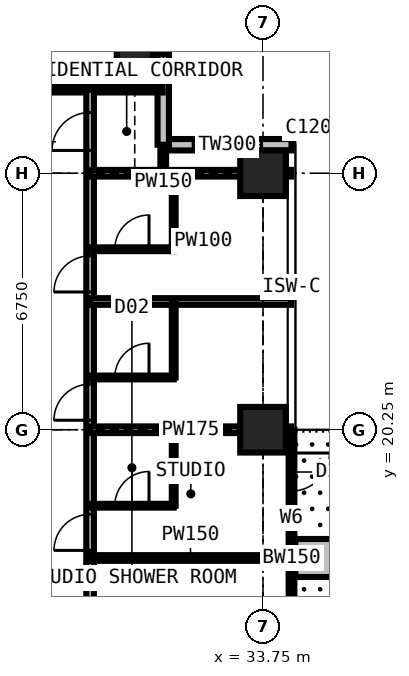
"""IFC4 building model, lengths in metres.
Left out: names, types, materials, properties, quantities, classifications, styles, units other than length and angle.
Written with IfcOpenShell. Run it as: python <this file> out.ifc"""

import sys

from ifc_helpers import new_model, si_unit, direction, frame, frame_2d, origin, origin_2d, place, context, subcontext, project, spatial, rectangle, extrude, element, fill, save


model = new_model("IFC4")
c1 = context("Model", 3, precision=1e-05, world=origin(), true_north=direction((0.0, 1.0)))
c2 = subcontext(c1, "Body", "Model", "MODEL_VIEW")
j1 = project(units=[si_unit("LENGTHUNIT", "METRE"), si_unit("PLANEANGLEUNIT", "RADIAN")], contexts=[c1])
p1 = place(None, origin())
s1 = spatial("IfcSite", under=j1, at=p1, CompositionType="ELEMENT")
p2 = place(p1, origin())
s2 = spatial("IfcBuilding", under=s1, at=p2, CompositionType="ELEMENT")
p3 = place(p2, frame((0.0, 0.0, 192.6)))
s3 = spatial("IfcBuildingStorey", under=s2, at=p3, CompositionType="ELEMENT", Elevation=192.6)
p4 = place(p3, frame((30.375, 30.375, 0.0), z_axis=(0.0, 0.0, 1.0), x_axis=(1.0, 0.0, 0.0)))
e1 = element("IfcColumn", 1, at=p4, inside=s3, PredefinedType="COLUMN", context=c2, shape_type="SweptSolid", body=[
    extrude(rectangle(XDim=0.95, YDim=0.95, at=origin_2d()), origin(), (0.0, 0.0, 1.0), 3.6),
])
for number, where, z_axis, x_axis in (
    (2, (33.75, 20.25, 0.0), (0.0, 0.0, 1.0), (1.0, 0.0, 0.0)),
    (3, (33.75, 27.0, 0.0), (0.0, 0.0, 1.0), (1.0, 0.0, 0.0)),
):
    element("IfcColumn", number, at=place(p3, frame(where, z_axis=z_axis, x_axis=x_axis)), inside=s3, PredefinedType="COLUMN", context=c2, shape_type="SweptSolid", body=[
        extrude(rectangle(XDim=1.2, YDim=1.2, at=origin_2d()), origin(), (0.0, 0.0, 1.0), 3.6),
    ])
p5 = place(p3, frame((34.5, 20.25, 0.0), z_axis=(0.0, 0.0, 1.0), x_axis=(0.0, -1.0, 0.0)))
e4 = element("IfcWall", 4, at=p5, inside=s3, PredefinedType="SOLIDWALL", context=c2, shape_type="SweptSolid", body=[
    extrude(rectangle(XDim=6.75, YDim=0.15, at=frame_2d((3.375, 0.0))), origin(), (0.0, 0.0, 1.0), 3.375),
])
p6 = place(p5, frame((0.613, 0.0, 0.0)))
e5 = element("IfcOpeningElement", 5, at=p6, cuts=e4, PredefinedType="OPENING", context=c2, shape_type="SweptSolid", body=[
    extrude(rectangle(XDim=1.0, YDim=2.2, at=frame_2d((0.5, 1.1))), frame((0.0, 0.085, 0.0), z_axis=(0.0, -1.0, 0.0), x_axis=(1.0, 0.0, 0.0)), (0.0, 0.0, 1.0), 0.17),
])
p7 = place(p5, frame((1.725, 0.0, 0.9)))
e6 = element("IfcOpeningElement", 6, at=p7, cuts=e4, PredefinedType="OPENING", context=c2, shape_type="SweptSolid", body=[
    extrude(rectangle(XDim=1.2, YDim=1.8, at=frame_2d((0.6, 0.9))), frame((0.0, 0.085, 0.0), z_axis=(0.0, -1.0, 0.0), x_axis=(1.0, 0.0, 0.0)), (0.0, 0.0, 1.0), 0.17),
])
p8 = place(p5, frame((5.137, 0.0, 0.0)))
e7 = element("IfcOpeningElement", 7, at=p8, cuts=e4, PredefinedType="OPENING", context=c2, shape_type="SweptSolid", body=[
    extrude(rectangle(XDim=1.0, YDim=2.2, at=frame_2d((0.5, 1.1))), frame((0.0, 0.085, 0.0), z_axis=(0.0, -1.0, 0.0), x_axis=(1.0, 0.0, 0.0)), (0.0, 0.0, 1.0), 0.17),
])
p9 = place(p5, frame((3.825, 0.0, 0.9)))
e8 = element("IfcOpeningElement", 8, at=p9, cuts=e4, PredefinedType="OPENING", context=c2, shape_type="SweptSolid", body=[
    extrude(rectangle(XDim=1.2, YDim=1.8, at=frame_2d((0.6, 0.9))), frame((0.0, 0.085, 0.0), z_axis=(0.0, -1.0, 0.0), x_axis=(1.0, 0.0, 0.0)), (0.0, 0.0, 1.0), 0.17),
])
p10 = place(p3, frame((34.5, 27.75, 0.0), z_axis=(0.0, 0.0, 1.0), x_axis=(-1.0, 0.0, 0.0)))
e9 = element("IfcWall", 9, at=p10, inside=s3, PredefinedType="SOLIDWALL", context=c2, shape_type="SweptSolid", body=[
    extrude(rectangle(XDim=3.375, YDim=0.3, at=frame_2d((1.688, 0.0))), origin(), (0.0, 0.0, 1.0), 3.375),
])
p11 = place(p10, frame((0.788, 0.0, 0.6)))
e10 = element("IfcOpeningElement", 10, at=p11, cuts=e9, PredefinedType="OPENING", context=c2, shape_type="SweptSolid", body=[
    extrude(rectangle(XDim=1.8, YDim=2.1, at=frame_2d((0.9, 1.05))), frame((0.0, 0.16, 0.0), z_axis=(0.0, -1.0, 0.0), x_axis=(1.0, 0.0, 0.0)), (0.0, 0.0, 1.0), 0.32),
])
p12 = place(p3, frame((31.125, 27.75, 0.0), z_axis=(0.0, 0.0, 1.0), x_axis=(0.0, 1.0, 0.0)))
e11 = element("IfcWall", 11, at=p12, inside=s3, PredefinedType="SOLIDWALL", context=c2, shape_type="SweptSolid", body=[
    extrude(rectangle(XDim=3.375, YDim=0.3, at=frame_2d((1.688, 0.0))), origin(), (0.0, 0.0, 1.0), 3.375),
])
p13 = place(p12, frame((1.663, 0.0, 0.9)))
e12 = element("IfcOpeningElement", 12, at=p13, cuts=e11, PredefinedType="OPENING", context=c2, shape_type="SweptSolid", body=[
    extrude(rectangle(XDim=1.5, YDim=1.8, at=frame_2d((0.75, 0.9))), frame((0.0, 0.16, 0.0), z_axis=(0.0, -1.0, 0.0), x_axis=(1.0, 0.0, 0.0)), (0.0, 0.0, 1.0), 0.32),
])
p14 = place(p3, frame((34.6, 16.875, 0.0), z_axis=(0.0, 0.0, 1.0), x_axis=(1.0, 0.0, 0.0)))
e13 = element("IfcWall", 13, at=p14, inside=s3, PredefinedType="USERDEFINED", context=c2, shape_type="SweptSolid", body=[
    extrude(rectangle(XDim=2.2, YDim=1.0, at=frame_2d((1.1, 0.0))), origin(), (0.0, 0.0, 1.0), 0.9),
])
p15 = place(p3, frame((11.3, 29.2, 0.0), z_axis=(0.0, 0.0, 1.0), x_axis=(1.0, 0.0, 0.0)))
e14 = element("IfcWall", 14, at=p15, inside=s3, PredefinedType="PARTITIONING", context=c2, shape_type="SweptSolid", body=[
    extrude(rectangle(XDim=19.809, YDim=0.15, at=frame_2d((9.904, 0.0))), origin(), (0.0, 0.0, 1.0), 3.375),
])
p16 = place(p15, frame((12.9, 0.0, 0.0)))
e15 = element("IfcOpeningElement", 15, at=p16, cuts=e14, PredefinedType="OPENING", context=c2, shape_type="SweptSolid", body=[
    extrude(rectangle(XDim=1.0, YDim=2.2, at=frame_2d((0.5, 1.1))), frame((0.0, 0.085, 0.0), z_axis=(0.0, -1.0, 0.0), x_axis=(1.0, 0.0, 0.0)), (0.0, 0.0, 1.0), 0.17),
])
p17 = place(p15, frame((5.825, 0.0, 0.0)))
e16 = element("IfcOpeningElement", 16, at=p17, cuts=e14, PredefinedType="OPENING", context=c2, shape_type="SweptSolid", body=[
    extrude(rectangle(XDim=0.95, YDim=2.2, at=frame_2d((0.475, 1.1))), frame((0.0, 0.085, 0.0), z_axis=(0.0, -1.0, 0.0), x_axis=(1.0, 0.0, 0.0)), (0.0, 0.0, 1.0), 0.17),
])
p18 = place(p15, frame((0.6, 0.0, 0.0)))
e17 = element("IfcOpeningElement", 17, at=p18, cuts=e14, PredefinedType="OPENING", context=c2, shape_type="SweptSolid", body=[
    extrude(rectangle(XDim=1.0, YDim=2.2, at=frame_2d((0.5, 1.1))), frame((0.0, 0.085, 0.0), z_axis=(0.0, -1.0, 0.0), x_axis=(1.0, 0.0, 0.0)), (0.0, 0.0, 1.0), 0.17),
])
p19 = place(p3, frame((29.2, 11.3, 0.0), z_axis=(0.0, 0.0, 1.0), x_axis=(0.0, 1.0, 0.0)))
e18 = element("IfcWall", 18, at=p19, inside=s3, PredefinedType="PARTITIONING", context=c2, shape_type="SweptSolid", body=[
    extrude(rectangle(XDim=17.9, YDim=0.2, at=frame_2d((8.95, 0.0))), origin(), (0.0, 0.0, 1.0), 3.375),
])
p20 = place(p19, frame((5.775, 0.0, 0.0)))
e19 = element("IfcOpeningElement", 19, at=p20, cuts=e18, PredefinedType="OPENING", context=c2, shape_type="SweptSolid", body=[
    extrude(rectangle(XDim=0.95, YDim=2.2, at=frame_2d((0.475, 1.1))), frame((0.0, 0.11, 0.0), z_axis=(0.0, -1.0, 0.0), x_axis=(1.0, 0.0, 0.0)), (0.0, 0.0, 1.0), 0.22),
])
p21 = place(p19, frame((9.2, 0.0, 0.0)))
e20 = element("IfcOpeningElement", 20, at=p21, cuts=e18, PredefinedType="OPENING", context=c2, shape_type="SweptSolid", body=[
    extrude(rectangle(XDim=0.95, YDim=2.2, at=frame_2d((0.475, 1.1))), frame((0.0, 0.11, 0.0), z_axis=(0.0, -1.0, 0.0), x_axis=(1.0, 0.0, 0.0)), (0.0, 0.0, 1.0), 0.22),
])
p22 = place(p19, frame((12.575, 0.0, 0.0)))
e21 = element("IfcOpeningElement", 21, at=p22, cuts=e18, PredefinedType="OPENING", context=c2, shape_type="SweptSolid", body=[
    extrude(rectangle(XDim=0.95, YDim=2.2, at=frame_2d((0.475, 1.1))), frame((0.0, 0.11, 0.0), z_axis=(0.0, -1.0, 0.0), x_axis=(1.0, 0.0, 0.0)), (0.0, 0.0, 1.0), 0.22),
])
p23 = place(p19, frame((16.3, 0.0, 0.0)))
e22 = element("IfcOpeningElement", 22, at=p23, cuts=e18, PredefinedType="OPENING", context=c2, shape_type="SweptSolid", body=[
    extrude(rectangle(XDim=1.0, YDim=2.2, at=frame_2d((0.5, 1.1))), frame((0.0, 0.11, 0.0), z_axis=(0.0, -1.0, 0.0), x_axis=(1.0, 0.0, 0.0)), (0.0, 0.0, 1.0), 0.22),
])
p24 = place(p3, frame((29.2, 16.875, 0.0), z_axis=(0.0, 0.0, 1.0), x_axis=(1.0, 0.0, 0.0)))
e23 = element("IfcWall", 23, at=p24, inside=s3, PredefinedType="PARTITIONING", context=c2, shape_type="SweptSolid", body=[
    extrude(rectangle(XDim=5.284, YDim=0.15, at=frame_2d((2.642, 0.0))), origin(), (0.0, 0.0, 1.0), 3.375),
])
p25 = place(p3, frame((29.2, 18.25, 0.0), z_axis=(0.0, 0.0, 1.0), x_axis=(1.0, 0.0, 0.0)))
e24 = element("IfcWall", 24, at=p25, inside=s3, PredefinedType="PARTITIONING", context=c2, shape_type="SweptSolid", body=[
    extrude(rectangle(XDim=2.2, YDim=0.1, at=frame_2d((1.1, 0.0))), origin(), (0.0, 0.0, 1.0), 3.375),
])
p26 = place(p25, frame((0.65, 0.0, 0.0)))
e25 = element("IfcOpeningElement", 25, at=p26, cuts=e24, PredefinedType="OPENING", context=c2, shape_type="SweptSolid", body=[
    extrude(rectangle(XDim=0.9, YDim=2.2, at=frame_2d((0.45, 1.1))), frame((0.0, 0.06, 0.0), z_axis=(0.0, -1.0, 0.0), x_axis=(1.0, 0.0, 0.0)), (0.0, 0.0, 1.0), 0.12),
])
p27 = place(p3, frame((29.2, 20.25, 0.0), z_axis=(0.0, 0.0, 1.0), x_axis=(1.0, 0.0, 0.0)))
e26 = element("IfcWall", 26, at=p27, inside=s3, PredefinedType="PARTITIONING", context=c2, shape_type="SweptSolid", body=[
    extrude(rectangle(XDim=5.284, YDim=0.175, at=frame_2d((2.642, 0.0))), origin(), (0.0, 0.0, 1.0), 2.806),
])
p28 = place(p3, frame((29.2, 21.625, 0.0), z_axis=(0.0, 0.0, 1.0), x_axis=(1.0, 0.0, 0.0)))
e27 = element("IfcWall", 27, at=p28, inside=s3, PredefinedType="PARTITIONING", context=c2, shape_type="SweptSolid", body=[
    extrude(rectangle(XDim=2.2, YDim=0.1, at=frame_2d((1.1, 0.0))), origin(), (0.0, 0.0, 1.0), 3.375),
])
p29 = place(p28, frame((0.65, 0.0, 0.0)))
e28 = element("IfcOpeningElement", 28, at=p29, cuts=e27, PredefinedType="OPENING", context=c2, shape_type="SweptSolid", body=[
    extrude(rectangle(XDim=0.9, YDim=2.2, at=frame_2d((0.45, 1.1))), frame((0.0, 0.06, 0.0), z_axis=(0.0, -1.0, 0.0), x_axis=(1.0, 0.0, 0.0)), (0.0, 0.0, 1.0), 0.12),
])
p30 = place(p3, frame((29.2, 23.625, 0.0), z_axis=(0.0, 0.0, 1.0), x_axis=(1.0, 0.0, 0.0)))
e29 = element("IfcWall", 29, at=p30, inside=s3, PredefinedType="PARTITIONING", context=c2, shape_type="SweptSolid", body=[
    extrude(rectangle(XDim=5.284, YDim=0.175, at=frame_2d((2.642, 0.0))), origin(), (0.0, 0.0, 1.0), 3.375),
])
p31 = place(p3, frame((29.2, 25.0, 0.0), z_axis=(0.0, 0.0, 1.0), x_axis=(1.0, 0.0, 0.0)))
e30 = element("IfcWall", 30, at=p31, inside=s3, PredefinedType="PARTITIONING", context=c2, shape_type="SweptSolid", body=[
    extrude(rectangle(XDim=2.2, YDim=0.1, at=frame_2d((1.1, 0.0))), origin(), (0.0, 0.0, 1.0), 3.375),
])
p32 = place(p31, frame((0.65, 0.0, 0.0)))
e31 = element("IfcOpeningElement", 31, at=p32, cuts=e30, PredefinedType="OPENING", context=c2, shape_type="SweptSolid", body=[
    extrude(rectangle(XDim=0.9, YDim=2.2, at=frame_2d((0.45, 1.1))), frame((0.0, 0.06, 0.0), z_axis=(0.0, -1.0, 0.0), x_axis=(1.0, 0.0, 0.0)), (0.0, 0.0, 1.0), 0.12),
])
p33 = place(p3, frame((29.2, 27.0, 0.0), z_axis=(0.0, 0.0, 1.0), x_axis=(1.0, 0.0, 0.0)))
e32 = element("IfcWall", 32, at=p33, inside=s3, PredefinedType="PARTITIONING", context=c2, shape_type="SweptSolid", body=[
    extrude(rectangle(XDim=5.284, YDim=0.175, at=frame_2d((2.642, 0.0))), origin(), (0.0, 0.0, 1.0), 2.806),
])
p34 = place(p3, frame((31.125, 27.0, 0.0), z_axis=(0.0, 0.0, 1.0), x_axis=(0.0, 1.0, 0.0)))
e33 = element("IfcWall", 33, at=p34, inside=s3, PredefinedType="PARTITIONING", context=c2, shape_type="SweptSolid", body=[
    extrude(rectangle(XDim=0.734, YDim=0.15, at=frame_2d((0.367, 0.0))), origin(), (0.0, 0.0, 1.0), 3.375),
])
for number, where, z_axis, x_axis in (
    (34, (31.4, 18.25, 0.0), (0.0, 0.0, 1.0), (0.0, 1.0, 0.0)),
    (35, (31.4, 21.625, 0.0), (0.0, 0.0, 1.0), (0.0, 1.0, 0.0)),
    (36, (31.4, 25.0, 0.0), (0.0, 0.0, 1.0), (0.0, 1.0, 0.0)),
):
    element("IfcWall", number, at=place(p3, frame(where, z_axis=z_axis, x_axis=x_axis)), inside=s3, PredefinedType="PARTITIONING", context=c2, shape_type="SweptSolid", body=[
        extrude(rectangle(XDim=2.0, YDim=0.1, at=frame_2d((1.0, 0.0))), origin(), (0.0, 0.0, 1.0), 3.375),
    ])
p35 = place(p6, origin())
e37 = element("IfcDoor", 37, at=p35, inside=s3, OperationType="SINGLE_SWING_LEFT", PredefinedType="DOOR", context=c2, shape_type="SweptSolid", body=[
    extrude(rectangle(XDim=1.0, YDim=2.2, at=frame_2d((0.5, 1.1))), frame((0.0, 0.025, 0.0), z_axis=(0.0, -1.0, 0.0), x_axis=(1.0, 0.0, 0.0)), (0.0, 0.0, 1.0), 0.05),
])
fill(e5, e37)
p36 = place(p7, origin())
e38 = element("IfcWindow", 38, at=p36, inside=s3, PartitioningType="SINGLE_PANEL", PredefinedType="WINDOW", context=c2, shape_type="SweptSolid", body=[
    extrude(rectangle(XDim=1.2, YDim=1.8, at=frame_2d((0.6, 0.9))), frame((0.0, 0.03, 0.0), z_axis=(0.0, -1.0, 0.0), x_axis=(1.0, 0.0, 0.0)), (0.0, 0.0, 1.0), 0.06),
])
fill(e6, e38)
p37 = place(p9, origin())
e39 = element("IfcWindow", 39, at=p37, inside=s3, PartitioningType="SINGLE_PANEL", PredefinedType="WINDOW", context=c2, shape_type="SweptSolid", body=[
    extrude(rectangle(XDim=1.2, YDim=1.8, at=frame_2d((0.6, 0.9))), frame((0.0, 0.03, 0.0), z_axis=(0.0, -1.0, 0.0), x_axis=(1.0, 0.0, 0.0)), (0.0, 0.0, 1.0), 0.06),
])
fill(e8, e39)
p38 = place(p11, origin())
e40 = element("IfcWindow", 40, at=p38, inside=s3, PartitioningType="SINGLE_PANEL", PredefinedType="WINDOW", context=c2, shape_type="SweptSolid", body=[
    extrude(rectangle(XDim=1.8, YDim=2.1, at=frame_2d((0.9, 1.05))), frame((0.0, 0.03, 0.0), z_axis=(0.0, -1.0, 0.0), x_axis=(1.0, 0.0, 0.0)), (0.0, 0.0, 1.0), 0.06),
])
fill(e10, e40)
p39 = place(p13, origin())
e41 = element("IfcWindow", 41, at=p39, inside=s3, PartitioningType="SINGLE_PANEL", PredefinedType="WINDOW", context=c2, shape_type="SweptSolid", body=[
    extrude(rectangle(XDim=1.5, YDim=1.8, at=frame_2d((0.75, 0.9))), frame((0.0, 0.03, 0.0), z_axis=(0.0, -1.0, 0.0), x_axis=(1.0, 0.0, 0.0)), (0.0, 0.0, 1.0), 0.06),
])
fill(e12, e41)
p40 = place(p20, origin())
e42 = element("IfcDoor", 42, at=p40, inside=s3, OperationType="SINGLE_SWING_LEFT", PredefinedType="DOOR", context=c2, shape_type="SweptSolid", body=[
    extrude(rectangle(XDim=0.95, YDim=2.2, at=frame_2d((0.475, 1.1))), frame((0.0, 0.025, 0.0), z_axis=(0.0, -1.0, 0.0), x_axis=(1.0, 0.0, 0.0)), (0.0, 0.0, 1.0), 0.05),
])
fill(e19, e42)
p41 = place(p26, origin())
e43 = element("IfcDoor", 43, at=p41, inside=s3, OperationType="SINGLE_SWING_RIGHT", PredefinedType="DOOR", context=c2, shape_type="SweptSolid", body=[
    extrude(rectangle(XDim=0.9, YDim=2.2, at=frame_2d((0.45, 1.1))), frame((0.0, 0.025, 0.0), z_axis=(0.0, -1.0, 0.0), x_axis=(1.0, 0.0, 0.0)), (0.0, 0.0, 1.0), 0.05),
])
fill(e25, e43)
p42 = place(p21, origin())
e44 = element("IfcDoor", 44, at=p42, inside=s3, OperationType="SINGLE_SWING_LEFT", PredefinedType="DOOR", context=c2, shape_type="SweptSolid", body=[
    extrude(rectangle(XDim=0.95, YDim=2.2, at=frame_2d((0.475, 1.1))), frame((0.0, 0.025, 0.0), z_axis=(0.0, -1.0, 0.0), x_axis=(1.0, 0.0, 0.0)), (0.0, 0.0, 1.0), 0.05),
])
fill(e20, e44)
p43 = place(p29, origin())
e45 = element("IfcDoor", 45, at=p43, inside=s3, OperationType="SINGLE_SWING_RIGHT", PredefinedType="DOOR", context=c2, shape_type="SweptSolid", body=[
    extrude(rectangle(XDim=0.9, YDim=2.2, at=frame_2d((0.45, 1.1))), frame((0.0, 0.025, 0.0), z_axis=(0.0, -1.0, 0.0), x_axis=(1.0, 0.0, 0.0)), (0.0, 0.0, 1.0), 0.05),
])
fill(e28, e45)
p44 = place(p22, origin())
e46 = element("IfcDoor", 46, at=p44, inside=s3, OperationType="SINGLE_SWING_LEFT", PredefinedType="DOOR", context=c2, shape_type="SweptSolid", body=[
    extrude(rectangle(XDim=0.95, YDim=2.2, at=frame_2d((0.475, 1.1))), frame((0.0, 0.025, 0.0), z_axis=(0.0, -1.0, 0.0), x_axis=(1.0, 0.0, 0.0)), (0.0, 0.0, 1.0), 0.05),
])
fill(e21, e46)
p45 = place(p32, origin())
e47 = element("IfcDoor", 47, at=p45, inside=s3, OperationType="SINGLE_SWING_RIGHT", PredefinedType="DOOR", context=c2, shape_type="SweptSolid", body=[
    extrude(rectangle(XDim=0.9, YDim=2.2, at=frame_2d((0.45, 1.1))), frame((0.0, 0.025, 0.0), z_axis=(0.0, -1.0, 0.0), x_axis=(1.0, 0.0, 0.0)), (0.0, 0.0, 1.0), 0.05),
])
fill(e31, e47)
p46 = place(p23, origin())
e48 = element("IfcDoor", 48, at=p46, inside=s3, OperationType="SINGLE_SWING_LEFT", PredefinedType="DOOR", context=c2, shape_type="SweptSolid", body=[
    extrude(rectangle(XDim=1.0, YDim=2.2, at=frame_2d((0.5, 1.1))), frame((0.0, 0.025, 0.0), z_axis=(0.0, -1.0, 0.0), x_axis=(1.0, 0.0, 0.0)), (0.0, 0.0, 1.0), 0.05),
])
fill(e22, e48)
save(model, sys.argv[1])
